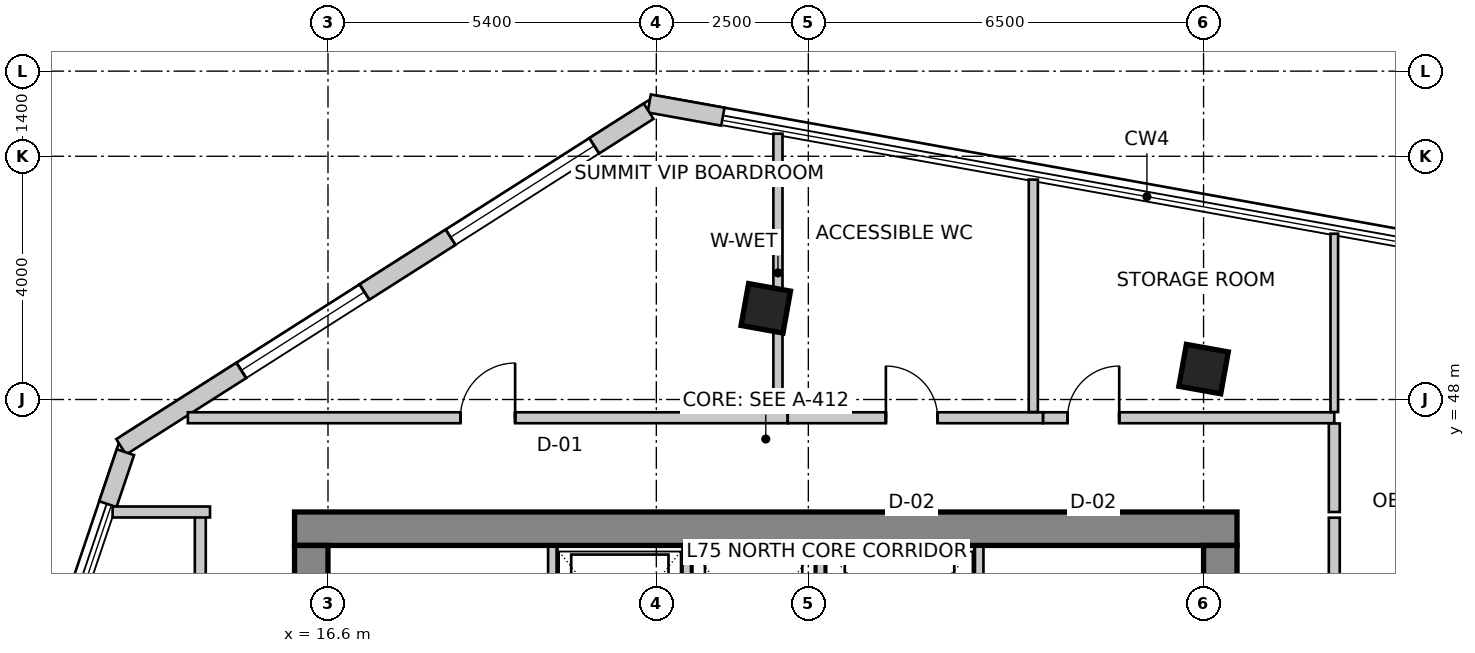
"""IFC4 building model, lengths in metres.
Left out: names, types, materials, properties, quantities, classifications, styles, units other than length and angle.
Written with IfcOpenShell. Run it as: python <this file> out.ifc"""

import sys

from ifc_helpers import new_model, si_unit, direction, frame, frame_2d, origin, origin_2d, place, context, subcontext, project, spatial, rectangle, extrude, source, transform, mapped, element, fill, save


model = new_model("IFC4")
c1 = context("Model", 3, precision=1e-05, world=origin(), true_north=direction((0.0, 1.0)))
c2 = subcontext(c1, "Body", "Model", "MODEL_VIEW")
j1 = project(units=[si_unit("LENGTHUNIT", "METRE"), si_unit("PLANEANGLEUNIT", "RADIAN")], contexts=[c1])
p1 = place(None, origin())
s1 = spatial("IfcSite", under=j1, at=p1, CompositionType="ELEMENT")
p2 = place(p1, origin())
s2 = spatial("IfcBuilding", under=s1, at=p2, CompositionType="ELEMENT")
p3 = place(p2, frame((0.0, 0.0, 292.5)))
s3 = spatial("IfcBuildingStorey", under=s2, at=p3, CompositionType="ELEMENT", Elevation=292.5)
p4 = place(p3, frame((16.05, 45.875, 0.0), z_axis=(0.0, 0.0, 1.0), x_axis=(1.0, 0.0, 0.0)))
e1 = element("IfcWall", 1, at=p4, inside=s3, PredefinedType="SHEAR", context=c2, shape_type="SweptSolid", body=[
    extrude(rectangle(XDim=15.5, YDim=0.55, at=frame_2d((7.75, 0.0))), origin(), (0.0, 0.0, 1.0), 4.0),
])
p5 = place(p3, frame((16.325, 34.2, 0.0), z_axis=(0.0, 0.0, 1.0), x_axis=(0.0, 1.0, 0.0)))
e2 = element("IfcWall", 2, at=p5, inside=s3, PredefinedType="SHEAR", context=c2, shape_type="SweptSolid", body=[
    extrude(rectangle(XDim=11.4, YDim=0.55, at=frame_2d((5.7, 0.0))), origin(), (0.0, 0.0, 1.0), 4.0),
])
m1 = source(origin(), c2, "Body", "SweptSolid", [
    extrude(rectangle(XDim=1.1, YDim=2.15, at=frame_2d((0.55, 1.075))), frame((0.0, 0.285, 0.0), z_axis=(0.0, -1.0, 0.0), x_axis=(1.0, 0.0, 0.0)), (0.0, 0.0, 1.0), 0.57),
])
p6 = place(p5, frame((7.15, 0.0, 0.0)))
e3 = element("IfcOpeningElement", 3, at=p6, cuts=e2, PredefinedType="OPENING", context=c2, shape_type="MappedRepresentation", body=[
    mapped(m1, transform((0.0, 0.0, 0.0), scale=1.0)),
])
p7 = place(p3, frame((31.275, 34.2, 0.0), z_axis=(0.0, 0.0, 1.0), x_axis=(0.0, 1.0, 0.0)))
e4 = element("IfcWall", 4, at=p7, inside=s3, PredefinedType="SHEAR", context=c2, shape_type="SweptSolid", body=[
    extrude(rectangle(XDim=11.4, YDim=0.55, at=frame_2d((5.7, 0.0))), origin(), (0.0, 0.0, 1.0), 4.0),
])
p8 = place(p7, frame((7.35, 0.0, 0.0)))
e5 = element("IfcOpeningElement", 5, at=p8, cuts=e4, PredefinedType="OPENING", context=c2, shape_type="MappedRepresentation", body=[
    mapped(m1, transform((0.0, 0.0, 0.0), scale=1.0)),
])
m2 = source(origin(), c2, "Body", "SweptSolid", [
    extrude(rectangle(XDim=0.7, YDim=0.7, at=origin_2d()), origin(), (0.0, 0.0, 1.0), 4.0),
])
for number, where, z_axis, x_axis in (
    (6, (23.8, 49.5, 0.0), (0.0, 0.0, 1.0), (0.984, -0.177, 0.0)),
    (7, (31.0, 48.5, 0.0), (0.0, 0.0, 1.0), (0.984, -0.177, 0.0)),
):
    element("IfcColumn", number, at=place(p3, frame(where, z_axis=z_axis, x_axis=x_axis)), inside=s3, PredefinedType="COLUMN", context=c2, shape_type="MappedRepresentation", body=[
        mapped(m2, transform((0.0, 0.0, 0.0), scale=1.0)),
    ])
p9 = place(p3, frame((23.094, 52.651, 0.0), z_axis=(0.0, 0.0, 1.0), x_axis=(-0.984233125072, 0.176876102146, 0.0)))
e8 = element("IfcWall", 8, at=p9, inside=s3, PredefinedType="SOLIDWALL", context=c2, shape_type="SweptSolid", body=[
    extrude(rectangle(XDim=1.23, YDim=0.3, at=frame_2d((0.615, 0.0))), origin(), (0.0, 0.0, 1.0), 3.75),
])
p10 = place(p3, frame((21.873, 52.741, 0.0), z_axis=(0.0, 0.0, 1.0), x_axis=(-0.843661487732, -0.536875492193, 0.0)))
e9 = element("IfcWall", 9, at=p10, inside=s3, PredefinedType="SOLIDWALL", context=c2, shape_type="SweptSolid", body=[
    extrude(rectangle(XDim=10.282, YDim=0.3, at=frame_2d((5.141, 0.0))), origin(), (0.0, 0.0, 1.0), 3.75),
])
m3 = source(origin(), c2, "Body", "SweptSolid", [
    extrude(rectangle(XDim=2.8, YDim=2.4, at=frame_2d((1.4, 1.2))), frame((0.0, 0.16, 0.0), z_axis=(0.0, -1.0, 0.0), x_axis=(1.0, 0.0, 0.0)), (0.0, 0.0, 1.0), 0.32),
])
p11 = place(p10, frame((1.06, 0.0, 0.85)))
e10 = element("IfcOpeningElement", 10, at=p11, cuts=e9, PredefinedType="OPENING", context=c2, shape_type="MappedRepresentation", body=[
    mapped(m3, transform((0.0, 0.0, 0.0), scale=1.0)),
])
m4 = source(origin(), c2, "Body", "SweptSolid", [
    extrude(rectangle(XDim=2.4, YDim=2.2, at=frame_2d((1.2, 1.1))), frame((0.0, 0.16, 0.0), z_axis=(0.0, -1.0, 0.0), x_axis=(1.0, 0.0, 0.0)), (0.0, 0.0, 1.0), 0.32),
])
p12 = place(p10, frame((5.539, 0.0, 0.85)))
e11 = element("IfcOpeningElement", 11, at=p12, cuts=e9, PredefinedType="OPENING", context=c2, shape_type="MappedRepresentation", body=[
    mapped(m4, transform((0.0, 0.0, 0.0), scale=1.0)),
])
p13 = place(p3, frame((13.269, 47.134, 0.0), z_axis=(0.0, 0.0, 1.0), x_axis=(-0.31995770778, -0.947431826166, 0.0)))
e12 = element("IfcWall", 12, at=p13, inside=s3, PredefinedType="SOLIDWALL", context=c2, shape_type="SweptSolid", body=[
    extrude(rectangle(XDim=0.903, YDim=0.3, at=frame_2d((0.451, 0.0))), origin(), (0.0, 0.0, 1.0), 3.75),
])
for number, where, z_axis, x_axis in (
    (13, (20.29, 43.28, 0.0), (0.0, 0.0, 1.0), (0.0, 1.0, 0.0)),
    (14, (27.31, 43.28, 0.0), (0.0, 0.0, 1.0), (0.0, 1.0, 0.0)),
):
    element("IfcWall", number, at=place(p3, frame(where, z_axis=z_axis, x_axis=x_axis)), inside=s3, PredefinedType="SOLIDWALL", context=c2, shape_type="SweptSolid", body=[
        extrude(rectangle(XDim=2.3, YDim=0.14, at=frame_2d((1.15, 0.0))), origin(), (0.0, 0.0, 1.0), 3.75),
    ])
for number, where, z_axis, x_axis in (
    (15, (22.5, 43.02, 0.0), (0.0, 0.0, 1.0), (0.0, 1.0, 0.0)),
    (16, (24.7, 43.02, 0.0), (0.0, 0.0, 1.0), (0.0, 1.0, 0.0)),
):
    element("IfcWall", number, at=place(p3, frame(where, z_axis=z_axis, x_axis=x_axis)), inside=s3, PredefinedType="SOLIDWALL", context=c2, shape_type="SweptSolid", body=[
        extrude(rectangle(XDim=2.56, YDim=0.14, at=frame_2d((1.28, 0.0))), origin(), (0.0, 0.0, 1.0), 3.75),
    ])
p14 = place(p3, frame((14.5, 33.744, 0.0), z_axis=(0.0, 0.0, 1.0), x_axis=(0.0, 1.0, 0.0)))
e17 = element("IfcWall", 17, at=p14, inside=s3, PredefinedType="PARTITIONING", context=c2, shape_type="SweptSolid", body=[
    extrude(rectangle(XDim=12.406, YDim=0.18, at=frame_2d((6.203, 0.0))), origin(), (0.0, 0.0, 1.0), 3.75),
])
m5 = source(origin(), c2, "Body", "SweptSolid", [
    extrude(rectangle(XDim=0.9, YDim=2.15, at=frame_2d((0.45, 1.075))), frame((0.0, 0.1, 0.0), z_axis=(0.0, -1.0, 0.0), x_axis=(1.0, 0.0, 0.0)), (0.0, 0.0, 1.0), 0.2),
])
p15 = place(p14, frame((4.37, 0.0, 0.0)))
e18 = element("IfcOpeningElement", 18, at=p15, cuts=e17, PredefinedType="OPENING", context=c2, shape_type="MappedRepresentation", body=[
    mapped(m5, transform((0.0, 0.0, 0.0), scale=1.0)),
])
p16 = place(p3, frame((14.66, 46.15, 0.0), z_axis=(0.0, 0.0, 1.0), x_axis=(-1.0, 0.0, 0.0)))
e19 = element("IfcWall", 19, at=p16, inside=s3, PredefinedType="PARTITIONING", context=c2, shape_type="SweptSolid", body=[
    extrude(rectangle(XDim=1.602, YDim=0.18, at=frame_2d((0.801, 0.0))), origin(), (0.0, 0.0, 1.0), 3.75),
])
p17 = place(p3, frame((14.295, 47.7, 0.0), z_axis=(0.0, 0.0, 1.0), x_axis=(1.0, 0.0, 0.0)))
e20 = element("IfcWall", 20, at=p17, inside=s3, PredefinedType="PARTITIONING", context=c2, shape_type="SweptSolid", body=[
    extrude(rectangle(XDim=9.865, YDim=0.18, at=frame_2d((4.932, 0.0))), origin(), (0.0, 0.0, 1.0), 3.335),
])
p18 = place(p17, frame((4.482, 0.0, 0.0)))
e21 = element("IfcOpeningElement", 21, at=p18, cuts=e20, PredefinedType="OPENING", context=c2, shape_type="MappedRepresentation", body=[
    mapped(m5, transform((0.0, 0.0, 0.0), scale=1.0)),
])
p19 = place(p3, frame((24.162, 47.7, 0.0), z_axis=(0.0, 0.0, 1.0), x_axis=(1.0, 0.0, 0.0)))
e22 = element("IfcWall", 22, at=p19, inside=s3, PredefinedType="PARTITIONING", context=c2, shape_type="SweptSolid", body=[
    extrude(rectangle(XDim=4.198, YDim=0.18, at=frame_2d((2.099, 0.0))), origin(), (0.0, 0.0, 1.0), 3.75),
])
m6 = source(origin(), c2, "Body", "SweptSolid", [
    extrude(rectangle(XDim=0.85, YDim=2.15, at=frame_2d((0.425, 1.075))), frame((0.0, 0.1, 0.0), z_axis=(0.0, -1.0, 0.0), x_axis=(1.0, 0.0, 0.0)), (0.0, 0.0, 1.0), 0.2),
])
p20 = place(p19, frame((1.613, 0.0, 0.0)))
e23 = element("IfcOpeningElement", 23, at=p20, cuts=e22, PredefinedType="OPENING", context=c2, shape_type="MappedRepresentation", body=[
    mapped(m6, transform((0.0, 0.0, 0.0), scale=1.0)),
])
p21 = place(p3, frame((28.362, 47.7, 0.0), z_axis=(0.0, 0.0, 1.0), x_axis=(1.0, 0.0, 0.0)))
e24 = element("IfcWall", 24, at=p21, inside=s3, PredefinedType="PARTITIONING", context=c2, shape_type="SweptSolid", body=[
    extrude(rectangle(XDim=4.788, YDim=0.18, at=frame_2d((2.394, 0.0))), origin(), (0.0, 0.0, 1.0), 3.188),
])
p22 = place(p21, frame((0.401, 0.0, 0.0)))
e25 = element("IfcOpeningElement", 25, at=p22, cuts=e24, PredefinedType="OPENING", context=c2, shape_type="MappedRepresentation", body=[
    mapped(m6, transform((0.0, 0.0, 0.0), scale=1.0)),
])
p23 = place(p3, frame((33.15, 47.606, 0.0), z_axis=(0.0, 0.0, 1.0), x_axis=(0.0, -1.0, 0.0)))
e26 = element("IfcWall", 26, at=p23, inside=s3, PredefinedType="PARTITIONING", context=c2, shape_type="SweptSolid", body=[
    extrude(rectangle(XDim=1.456, YDim=0.18, at=frame_2d((0.728, 0.0))), origin(), (0.0, 0.0, 1.0), 3.75),
])
p24 = place(p3, frame((33.15, 46.056, 0.0), z_axis=(0.0, 0.0, 1.0), x_axis=(0.0, -1.0, 0.0)))
e27 = element("IfcWall", 27, at=p24, inside=s3, PredefinedType="PARTITIONING", context=c2, shape_type="SweptSolid", body=[
    extrude(rectangle(XDim=6.216, YDim=0.18, at=frame_2d((3.108, 0.0))), origin(), (0.0, 0.0, 1.0), 3.188),
])
m7 = source(origin(), c2, "Body", "SweptSolid", [
    extrude(rectangle(XDim=1.6, YDim=2.15, at=frame_2d((0.8, 1.075))), frame((0.0, 0.1, 0.0), z_axis=(0.0, -1.0, 0.0), x_axis=(1.0, 0.0, 0.0)), (0.0, 0.0, 1.0), 0.2),
])
p25 = place(p24, frame((2.247, 0.0, 0.0)))
e28 = element("IfcOpeningElement", 28, at=p25, cuts=e27, PredefinedType="OPENING", context=c2, shape_type="MappedRepresentation", body=[
    mapped(m7, transform((0.0, 0.0, 0.0), scale=1.0)),
])
p26 = place(p3, frame((24.0, 52.371, 0.0), z_axis=(0.0, 0.0, 1.0), x_axis=(0.0, -1.0, 0.0)))
e29 = element("IfcWall", 29, at=p26, inside=s3, PredefinedType="PARTITIONING", context=c2, shape_type="SweptSolid", body=[
    extrude(rectangle(XDim=4.577, YDim=0.15, at=frame_2d((2.289, 0.0))), origin(), (0.0, 0.0, 1.0), 3.042),
])
p27 = place(p3, frame((28.2, 51.616, 0.0), z_axis=(0.0, 0.0, 1.0), x_axis=(0.0, -1.0, 0.0)))
e30 = element("IfcWall", 30, at=p27, inside=s3, PredefinedType="PARTITIONING", context=c2, shape_type="SweptSolid", body=[
    extrude(rectangle(XDim=3.822, YDim=0.15, at=frame_2d((1.911, 0.0))), origin(), (0.0, 0.0, 1.0), 3.042),
])
p28 = place(p3, frame((33.15, 50.727, 0.0), z_axis=(0.0, 0.0, 1.0), x_axis=(0.0, -1.0, 0.0)))
e31 = element("IfcWall", 31, at=p28, inside=s3, PredefinedType="PARTITIONING", context=c2, shape_type="SweptSolid", body=[
    extrude(rectangle(XDim=2.933, YDim=0.125, at=frame_2d((1.466, 0.0))), origin(), (0.0, 0.0, 1.0), 3.042),
])
m8 = source(origin(), c2, "Body", "SweptSolid", [
    extrude(rectangle(XDim=2.8, YDim=2.4, at=frame_2d((1.4, 1.2))), frame((0.0, -0.015, 0.0), z_axis=(0.0, -1.0, 0.0), x_axis=(1.0, 0.0, 0.0)), (0.0, 0.0, 1.0), 0.06),
])
p29 = place(p11, origin())
e32 = element("IfcWindow", 32, at=p29, inside=s3, PartitioningType="SINGLE_PANEL", PredefinedType="WINDOW", context=c2, shape_type="MappedRepresentation", body=[
    mapped(m8, transform((0.0, 0.0, 0.0), scale=1.0)),
])
fill(e10, e32)
m9 = source(origin(), c2, "Body", "SweptSolid", [
    extrude(rectangle(XDim=2.4, YDim=2.2, at=frame_2d((1.2, 1.1))), frame((0.0, -0.015, 0.0), z_axis=(0.0, -1.0, 0.0), x_axis=(1.0, 0.0, 0.0)), (0.0, 0.0, 1.0), 0.06),
])
p30 = place(p12, origin())
e33 = element("IfcWindow", 33, at=p30, inside=s3, PartitioningType="SINGLE_PANEL", PredefinedType="WINDOW", context=c2, shape_type="MappedRepresentation", body=[
    mapped(m9, transform((0.0, 0.0, 0.0), scale=1.0)),
])
fill(e11, e33)
m10 = source(origin(), c2, "Body", "SweptSolid", [
    extrude(rectangle(XDim=0.9, YDim=2.15, at=frame_2d((0.45, 1.075))), frame((0.0, 0.025, 0.0), z_axis=(0.0, -1.0, 0.0), x_axis=(1.0, 0.0, 0.0)), (0.0, 0.0, 1.0), 0.05),
])
p31 = place(p18, origin())
e34 = element("IfcDoor", 34, at=p31, inside=s3, OperationType="SINGLE_SWING_RIGHT", PredefinedType="DOOR", context=c2, shape_type="MappedRepresentation", body=[
    mapped(m10, transform((0.0, 0.0, 0.0), scale=1.0)),
])
fill(e21, e34)
m11 = source(origin(), c2, "Body", "SweptSolid", [
    extrude(rectangle(XDim=0.85, YDim=2.15, at=frame_2d((0.425, 1.075))), frame((0.0, 0.025, 0.0), z_axis=(0.0, -1.0, 0.0), x_axis=(1.0, 0.0, 0.0)), (0.0, 0.0, 1.0), 0.05),
])
p32 = place(p20, origin())
e35 = element("IfcDoor", 35, at=p32, inside=s3, OperationType="SINGLE_SWING_LEFT", PredefinedType="DOOR", context=c2, shape_type="MappedRepresentation", body=[
    mapped(m11, transform((0.0, 0.0, 0.0), scale=1.0)),
])
fill(e23, e35)
p33 = place(p22, origin())
e36 = element("IfcDoor", 36, at=p33, inside=s3, OperationType="SINGLE_SWING_RIGHT", PredefinedType="DOOR", context=c2, shape_type="MappedRepresentation", body=[
    mapped(m11, transform((0.0, 0.0, 0.0), scale=1.0)),
])
fill(e25, e36)
save(model, sys.argv[1])
